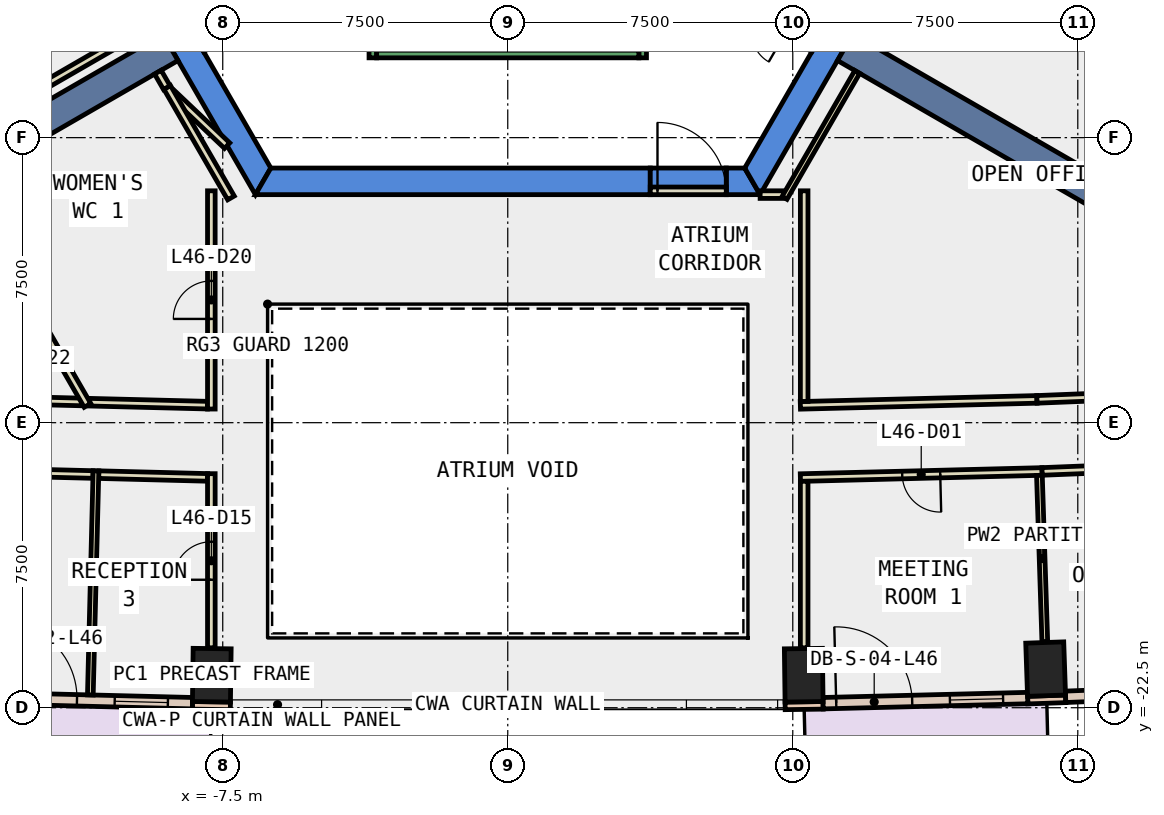
"""IFC4 building model, lengths in metres.
Left out: names, types, materials, properties, quantities, classifications, styles, units other than length and angle.
Written with IfcOpenShell. Run it as: python <this file> out.ifc"""

import sys

from ifc_helpers import new_model, si_unit, direction, frame, frame_2d, origin, origin_2d, place, context, subcontext, project, spatial, polyline, rectangle, outline, extrude, element, fill, save


model = new_model("IFC4")
c1 = context("Model", 3, precision=1e-05, world=origin(), true_north=direction((0.0, 1.0)))
c2 = subcontext(c1, "Body", "Model", "MODEL_VIEW")
j1 = project(units=[si_unit("LENGTHUNIT", "METRE"), si_unit("PLANEANGLEUNIT", "RADIAN")], contexts=[c1])
p1 = place(None, origin())
s1 = spatial("IfcSite", under=j1, at=p1, CompositionType="ELEMENT")
p2 = place(p1, origin())
s2 = spatial("IfcBuilding", under=s1, at=p2, CompositionType="ELEMENT")
p3 = place(p2, frame((0.0, 0.0, 206.6)))
s3 = spatial("IfcBuildingStorey", under=s2, at=p3, CompositionType="ELEMENT", Elevation=206.6)
for number, where, z_axis, x_axis in (
    (1, (-7.788, -21.644, -0.4), (0.0, 0.0, 1.0), (-1.0, 0.013, 0.0)),
    (2, (7.788, -21.644, -0.4), (0.0, 0.0, 1.0), (1.0, 0.013, 0.0)),
    (3, (14.154, -21.484, -0.4), (0.0, 0.0, 1.0), (0.999, 0.034, 0.0)),
):
    element("IfcColumn", number, at=place(p3, frame(where, z_axis=z_axis, x_axis=x_axis)), inside=s3, PredefinedType="COLUMN", context=c2, shape_type="SweptSolid", body=[
        extrude(rectangle(XDim=1.0, YDim=1.4, at=origin_2d()), origin(), (0.0, 0.0, 1.0), 4.2),
    ])
p4 = place(p3, frame((0.0, 0.0, -0.4)))
e4 = element("IfcWall", 4, at=p4, inside=s3, PredefinedType="SHEAR", context=c2, shape_type="SweptSolid", body=[
    extrude(outline(polyline([(-13.279, 2.5), (-6.64, -9.0), (-6.235, -8.3), (-12.471, 2.5), (-13.279, 2.5)])), origin(), (0.0, 0.0, 1.0), 4.2),
])
p5 = place(p3, frame((0.0, 0.0, -0.4)))
e5 = element("IfcWall", 5, at=p5, inside=s3, PredefinedType="SHEAR", context=c2, shape_type="SweptSolid", body=[
    extrude(outline(polyline([(3.75, -9.0), (3.75, -8.3), (-6.235, -8.3), (-6.64, -9.0), (3.75, -9.0)])), origin(), (0.0, 0.0, 1.0), 4.2),
])
p6 = place(p3, frame((0.0, 0.0, -0.4)))
e6 = element("IfcWall", 6, at=p6, inside=s3, PredefinedType="SHEAR", context=c2, shape_type="SweptSolid", body=[
    extrude(outline(polyline([(5.75, -8.3), (5.75, -9.0), (6.64, -9.0), (6.235, -8.3), (5.75, -8.3)])), origin(), (0.0, 0.0, 1.0), 4.2),
])
p7 = place(p3, frame((0.0, 0.0, 3.6)))
e7 = element("IfcWall", 7, at=p7, inside=s3, PredefinedType="SHEAR", context=c2, shape_type="SweptSolid", body=[
    extrude(outline(polyline([(5.75, -9.0), (5.75, -8.3), (3.75, -8.3), (3.75, -9.0), (5.75, -9.0)])), origin(), (0.0, 0.0, 1.0), 0.2),
])
p8 = place(p3, frame((0.0, 0.0, -0.4)))
e8 = element("IfcWall", 8, at=p8, inside=s3, PredefinedType="SHEAR", context=c2, shape_type="SweptSolid", body=[
    extrude(outline(polyline([(6.64, -9.0), (13.279, 2.5), (12.471, 2.5), (6.235, -8.3), (6.64, -9.0)])), origin(), (0.0, 0.0, 1.0), 4.2),
])
for number, where, z_axis, x_axis in (
    (9, (8.877, -5.125, -0.4), (0.0, 0.0, 1.0), (0.866, -0.5, 0.0)),
    (10, (-8.877, -5.125, -0.4), (0.0, 0.0, 1.0), (-0.866, -0.5, 0.0)),
):
    element("IfcWall", number, at=place(p3, frame(where, z_axis=z_axis, x_axis=x_axis)), inside=s3, PredefinedType="SHEAR", context=c2, shape_type="SweptSolid", body=[
        extrude(rectangle(XDim=9.0, YDim=0.8, at=frame_2d((4.5, 0.0))), origin(), (0.0, 0.0, 1.0), 4.2),
    ])
for number, where, z_axis, x_axis in (
    (11, (-8.299, -22.437, 0.0), (0.0, 0.0, 1.0), (1.0, -0.014, 0.0)),
    (12, (7.299, -22.451, 0.0), (0.0, 0.0, 1.0), (1.0, 0.014, 0.0)),
):
    element("IfcWall", number, at=place(p3, frame(where, z_axis=z_axis, x_axis=x_axis)), inside=s3, PredefinedType="STANDARD", context=c2, shape_type="SweptSolid", body=[
        extrude(rectangle(XDim=1.0, YDim=0.2, at=frame_2d((0.5, 0.0))), origin(), (0.0, 0.0, 1.0), 3.8),
    ])
p9 = place(p3, frame((13.682, -22.3, 0.0), z_axis=(0.0, 0.0, 1.0), x_axis=(0.999423561854, 0.033949138587, 0.0)))
e13 = element("IfcWall", 13, at=p9, inside=s3, PredefinedType="STANDARD", context=c2, shape_type="SweptSolid", body=[
    extrude(rectangle(XDim=1.0, YDim=0.2, at=frame_2d((0.5, 0.0))), origin(), (0.0, 0.0, 1.0), 3.8),
])
p10 = place(p3, frame((-13.681, -22.246, 0.0), z_axis=(0.0, 0.0, 1.0), x_axis=(0.999685717988, -0.025069209235, 0.0)))
e14 = element("IfcWall", 14, at=p10, inside=s3, PredefinedType="STANDARD", context=c2, shape_type="SweptSolid", body=[
    extrude(rectangle(XDim=5.385, YDim=0.3, at=frame_2d((2.693, 0.0))), origin(), (0.0, 0.0, 1.0), 3.8),
])
p11 = place(p10, frame((0.346, 0.0, 0.0)))
e15 = element("IfcOpeningElement", 15, at=p11, cuts=e14, PredefinedType="OPENING", context=c2, shape_type="SweptSolid", body=[
    extrude(rectangle(XDim=2.0, YDim=2.4, at=frame_2d((1.0, 1.2))), frame((0.0, 0.16, 0.0), z_axis=(0.0, -1.0, 0.0), x_axis=(1.0, 0.0, 0.0)), (0.0, 0.0, 1.0), 0.32),
])
p12 = place(p10, frame((3.339, 0.0, 0.9)))
e16 = element("IfcOpeningElement", 16, at=p12, cuts=e14, PredefinedType="OPENING", context=c2, shape_type="SweptSolid", body=[
    extrude(rectangle(XDim=1.4, YDim=2.6, at=frame_2d((0.7, 1.3))), frame((0.0, 0.16, 0.0), z_axis=(0.0, -1.0, 0.0), x_axis=(1.0, 0.0, 0.0)), (0.0, 0.0, 1.0), 0.32),
])
p13 = place(p3, frame((8.297, -22.381, 0.0), z_axis=(0.0, 0.0, 1.0), x_axis=(0.999685717988, 0.025069209235, 0.0)))
e17 = element("IfcWall", 17, at=p13, inside=s3, PredefinedType="STANDARD", context=c2, shape_type="SweptSolid", body=[
    extrude(rectangle(XDim=5.385, YDim=0.3, at=frame_2d((2.693, 0.0))), origin(), (0.0, 0.0, 1.0), 3.8),
])
p14 = place(p13, frame((0.346, 0.0, 0.0)))
e18 = element("IfcOpeningElement", 18, at=p14, cuts=e17, PredefinedType="OPENING", context=c2, shape_type="SweptSolid", body=[
    extrude(rectangle(XDim=2.0, YDim=2.4, at=frame_2d((1.0, 1.2))), frame((0.0, 0.16, 0.0), z_axis=(0.0, -1.0, 0.0), x_axis=(1.0, 0.0, 0.0)), (0.0, 0.0, 1.0), 0.32),
])
p15 = place(p13, frame((3.339, 0.0, 0.9)))
e19 = element("IfcOpeningElement", 19, at=p15, cuts=e17, PredefinedType="OPENING", context=c2, shape_type="SweptSolid", body=[
    extrude(rectangle(XDim=1.4, YDim=2.6, at=frame_2d((0.7, 1.3))), frame((0.0, 0.16, 0.0), z_axis=(0.0, -1.0, 0.0), x_axis=(1.0, 0.0, 0.0)), (0.0, 0.0, 1.0), 0.32),
])
p16 = place(p3, frame((14.679, -22.213, 0.0), z_axis=(0.0, 0.0, 1.0), x_axis=(0.999205241612, 0.039860822062, 0.0)))
e20 = element("IfcWall", 20, at=p16, inside=s3, PredefinedType="STANDARD", context=c2, shape_type="SweptSolid", body=[
    extrude(rectangle(XDim=5.365, YDim=0.3, at=frame_2d((2.683, 0.0))), origin(), (0.0, 0.0, 1.0), 3.8),
])
p17 = place(p16, frame((0.641, 0.0, 0.9)))
e21 = element("IfcOpeningElement", 21, at=p17, cuts=e20, PredefinedType="OPENING", context=c2, shape_type="SweptSolid", body=[
    extrude(rectangle(XDim=1.4, YDim=2.6, at=frame_2d((0.7, 1.3))), frame((0.0, 0.16, 0.0), z_axis=(0.0, -1.0, 0.0), x_axis=(1.0, 0.0, 0.0)), (0.0, 0.0, 1.0), 0.32),
])
p18 = place(p16, frame((3.324, 0.0, 0.9)))
e22 = element("IfcOpeningElement", 22, at=p18, cuts=e20, PredefinedType="OPENING", context=c2, shape_type="SweptSolid", body=[
    extrude(rectangle(XDim=1.4, YDim=2.6, at=frame_2d((0.7, 1.3))), frame((0.0, 0.16, 0.0), z_axis=(0.0, -1.0, 0.0), x_axis=(1.0, 0.0, 0.0)), (0.0, 0.0, 1.0), 0.32),
])
p19 = place(p3, frame((7.7, -14.544, 0.0), z_axis=(0.0, 0.0, 1.0), x_axis=(0.99968218628, 0.025209649611, 0.0)))
e23 = element("IfcWall", 23, at=p19, inside=s3, PredefinedType="PARTITIONING", context=c2, shape_type="SweptSolid", body=[
    extrude(rectangle(XDim=6.227, YDim=0.2, at=frame_2d((3.114, 0.0))), origin(), (0.0, 0.0, 1.0), 3.8),
])
p20 = place(p3, frame((13.925, -14.387, 0.0), z_axis=(0.0, 0.0, 1.0), x_axis=(0.999202986342, 0.039917315597, 0.0)))
e24 = element("IfcWall", 24, at=p20, inside=s3, PredefinedType="PARTITIONING", context=c2, shape_type="SweptSolid", body=[
    extrude(rectangle(XDim=5.382, YDim=0.2, at=frame_2d((2.691, 0.0))), origin(), (0.0, 0.0, 1.0), 3.8),
])
p21 = place(p3, frame((-11.009, -14.461, 0.0), z_axis=(0.0, 0.0, 1.0), x_axis=(0.999684451251, -0.025119672116, 0.0)))
e25 = element("IfcWall", 25, at=p21, inside=s3, PredefinedType="PARTITIONING", context=c2, shape_type="SweptSolid", body=[
    extrude(rectangle(XDim=3.11, YDim=0.2, at=frame_2d((1.555, 0.0))), origin(), (0.0, 0.0, 1.0), 3.8),
])
p22 = place(p3, frame((-13.925, -14.387, 0.0), z_axis=(0.0, 0.0, 1.0), x_axis=(0.999685678874, -0.025070768935, 0.0)))
e26 = element("IfcWall", 26, at=p22, inside=s3, PredefinedType="PARTITIONING", context=c2, shape_type="SweptSolid", body=[
    extrude(rectangle(XDim=2.717, YDim=0.2, at=frame_2d((1.358, 0.0))), origin(), (0.0, 0.0, 1.0), 3.8),
])
p23 = place(p22, frame((0.858, 0.0, 0.0)))
e27 = element("IfcOpeningElement", 27, at=p23, cuts=e26, PredefinedType="OPENING", context=c2, shape_type="SweptSolid", body=[
    extrude(rectangle(XDim=1.0, YDim=2.1, at=frame_2d((0.5, 1.05))), frame((0.0, 0.11, 0.0), z_axis=(0.0, -1.0, 0.0), x_axis=(1.0, 0.0, 0.0)), (0.0, 0.0, 1.0), 0.22),
])
p24 = place(p3, frame((14.061, -16.284, 0.0), z_axis=(0.0, 0.0, 1.0), x_axis=(-0.999679323762, -0.025322907453, 0.0)))
e28 = element("IfcWall", 28, at=p24, inside=s3, PredefinedType="PARTITIONING", context=c2, shape_type="SweptSolid", body=[
    extrude(rectangle(XDim=6.363, YDim=0.2, at=frame_2d((3.182, 0.0))), origin(), (0.0, 0.0, 1.0), 3.8),
])
p25 = place(p24, frame((2.682, 0.0, 0.0)))
e29 = element("IfcOpeningElement", 29, at=p25, cuts=e28, PredefinedType="OPENING", context=c2, shape_type="SweptSolid", body=[
    extrude(rectangle(XDim=1.0, YDim=2.1, at=frame_2d((0.5, 1.05))), frame((0.0, 0.11, 0.0), z_axis=(0.0, -1.0, 0.0), x_axis=(1.0, 0.0, 0.0)), (0.0, 0.0, 1.0), 0.22),
])
p26 = place(p3, frame((19.627, -16.061, 0.0), z_axis=(0.0, 0.0, 1.0), x_axis=(-0.999206061563, -0.039840262741, 0.0)))
e30 = element("IfcWall", 30, at=p26, inside=s3, PredefinedType="PARTITIONING", context=c2, shape_type="SweptSolid", body=[
    extrude(rectangle(XDim=5.57, YDim=0.2, at=frame_2d((2.785, 0.0))), origin(), (0.0, 0.0, 1.0), 3.8),
])
p27 = place(p26, frame((2.36, 0.0, 0.0)))
e31 = element("IfcOpeningElement", 31, at=p27, cuts=e30, PredefinedType="OPENING", context=c2, shape_type="SweptSolid", body=[
    extrude(rectangle(XDim=1.0, YDim=2.1, at=frame_2d((0.5, 1.05))), frame((0.0, 0.11, 0.0), z_axis=(0.0, -1.0, 0.0), x_axis=(1.0, 0.0, 0.0)), (0.0, 0.0, 1.0), 0.22),
])
p28 = place(p3, frame((-10.913, -16.364, 0.0), z_axis=(0.0, 0.0, 1.0), x_axis=(-0.999676990694, 0.02541484365, 0.0)))
e32 = element("IfcWall", 32, at=p28, inside=s3, PredefinedType="PARTITIONING", context=c2, shape_type="SweptSolid", body=[
    extrude(rectangle(XDim=3.074, YDim=0.2, at=frame_2d((1.537, 0.0))), origin(), (0.0, 0.0, 1.0), 3.8),
])
p29 = place(p3, frame((-7.9, -16.44, 0.0), z_axis=(0.0, 0.0, 1.0), x_axis=(-0.999675117104, 0.025488433531, 0.0)))
e33 = element("IfcWall", 33, at=p29, inside=s3, PredefinedType="PARTITIONING", context=c2, shape_type="SweptSolid", body=[
    extrude(rectangle(XDim=2.864, YDim=0.2, at=frame_2d((1.432, 0.0))), origin(), (0.0, 0.0, 1.0), 3.8),
])
p30 = place(p3, frame((6.641, -8.999, 0.0), z_axis=(0.0, 0.0, 1.0), x_axis=(1.0, 0.0, 0.0)))
e34 = element("IfcWall", 34, at=p30, inside=s3, PredefinedType="PARTITIONING", context=c2, shape_type="SweptSolid", body=[
    extrude(rectangle(XDim=0.617, YDim=0.2, at=frame_2d((0.309, 0.0))), origin(), (0.0, 0.0, 1.0), 3.8),
])
p31 = place(p3, frame((7.283, -9.086, 0.0), z_axis=(0.0, 0.0, 1.0), x_axis=(0.500035303972, 0.866005020067, 0.0)))
e35 = element("IfcWall", 35, at=p31, inside=s3, PredefinedType="PARTITIONING", context=c2, shape_type="SweptSolid", body=[
    extrude(rectangle(XDim=3.828, YDim=0.15, at=frame_2d((1.914, 0.0))), origin(), (0.0, 0.0, 1.0), 3.8),
])
p32 = place(p3, frame((7.8, -8.899, 0.0), z_axis=(0.0, 0.0, 1.0), x_axis=(0.0, -1.0, 0.0)))
e36 = element("IfcWall", 36, at=p32, inside=s3, PredefinedType="PARTITIONING", context=c2, shape_type="SweptSolid", body=[
    extrude(rectangle(XDim=5.542, YDim=0.2, at=frame_2d((2.771, 0.0))), origin(), (0.0, 0.0, 1.0), 3.8),
])
p33 = place(p3, frame((-8.84, -6.332, 0.0), z_axis=(0.0, 0.0, 1.0), x_axis=(0.726080635734, -0.687609562479, 0.0)))
e37 = element("IfcWall", 37, at=p33, inside=s3, PredefinedType="PARTITIONING", context=c2, shape_type="SweptSolid", body=[
    extrude(rectangle(XDim=2.005, YDim=0.2, at=frame_2d((1.003, 0.0))), origin(), (0.0, 0.0, 1.0), 3.8),
])
p34 = place(p3, frame((-7.8, -14.641, 0.0), z_axis=(0.0, 0.0, 1.0), x_axis=(0.0, 1.0, 0.0)))
e38 = element("IfcWall", 38, at=p34, inside=s3, PredefinedType="PARTITIONING", context=c2, shape_type="SweptSolid", body=[
    extrude(rectangle(XDim=5.742, YDim=0.2, at=frame_2d((2.871, 0.0))), origin(), (0.0, 0.0, 1.0), 3.8),
])
p35 = place(p34, frame((2.371, 0.0, 0.0)))
e39 = element("IfcOpeningElement", 39, at=p35, cuts=e38, PredefinedType="OPENING", context=c2, shape_type="SweptSolid", body=[
    extrude(rectangle(XDim=1.0, YDim=2.1, at=frame_2d((0.5, 1.05))), frame((0.0, 0.11, 0.0), z_axis=(0.0, -1.0, 0.0), x_axis=(1.0, 0.0, 0.0)), (0.0, 0.0, 1.0), 0.22),
])
p36 = place(p3, frame((-7.283, -9.086, 0.0), z_axis=(0.0, 0.0, 1.0), x_axis=(-0.499883958536, 0.86609238999, 0.0)))
e40 = element("IfcWall", 40, at=p36, inside=s3, PredefinedType="PARTITIONING", context=c2, shape_type="SweptSolid", body=[
    extrude(rectangle(XDim=3.359, YDim=0.2, at=frame_2d((1.679, 0.0))), origin(), (0.0, 0.0, 1.0), 3.8),
])
p37 = place(p3, frame((7.8, -16.542, 0.0), z_axis=(0.0, 0.0, 1.0), x_axis=(0.0, -1.0, 0.0)))
e41 = element("IfcWall", 41, at=p37, inside=s3, PredefinedType="PARTITIONING", context=c2, shape_type="SweptSolid", body=[
    extrude(rectangle(XDim=4.382, YDim=0.2, at=frame_2d((2.191, 0.0))), origin(), (0.0, 0.0, 1.0), 3.8),
])
p38 = place(p3, frame((-7.8, -20.924, 0.0), z_axis=(0.0, 0.0, 1.0), x_axis=(0.0, 1.0, 0.0)))
e42 = element("IfcWall", 42, at=p38, inside=s3, PredefinedType="PARTITIONING", context=c2, shape_type="SweptSolid", body=[
    extrude(rectangle(XDim=4.582, YDim=0.2, at=frame_2d((2.291, 0.0))), origin(), (0.0, 0.0, 1.0), 3.8),
])
p39 = place(p38, frame((1.791, 0.0, 0.0)))
e43 = element("IfcOpeningElement", 43, at=p39, cuts=e42, PredefinedType="OPENING", context=c2, shape_type="SweptSolid", body=[
    extrude(rectangle(XDim=1.0, YDim=2.1, at=frame_2d((0.5, 1.05))), frame((0.0, 0.11, 0.0), z_axis=(0.0, -1.0, 0.0), x_axis=(1.0, 0.0, 0.0)), (0.0, 0.0, 1.0), 0.22),
])
p40 = place(p3, frame((-8.973, -6.183, 0.0), z_axis=(0.0, 0.0, 1.0), x_axis=(-0.499557093027, 0.86628096528, 0.0)))
e44 = element("IfcWall", 44, at=p40, inside=s3, PredefinedType="PARTITIONING", context=c2, shape_type="SweptSolid", body=[
    extrude(rectangle(XDim=0.469, YDim=0.2, at=frame_2d((0.234, 0.0))), origin(), (0.0, 0.0, 1.0), 3.8),
])
p41 = place(p3, frame((-15.076, -7.788, 0.0), z_axis=(0.0, 0.0, 1.0), x_axis=(0.866092814325, 0.499883223337, 0.0)))
e45 = element("IfcWall", 45, at=p41, inside=s3, PredefinedType="PARTITIONING", context=c2, shape_type="SweptSolid", body=[
    extrude(rectangle(XDim=5.477, YDim=0.2, at=frame_2d((2.739, 0.0))), origin(), (0.0, 0.0, 1.0), 3.8),
])
p42 = place(p3, frame((-11.059, -14.545, 0.0), z_axis=(0.0, 0.0, 1.0), x_axis=(-0.499935899035, 0.866062409331, 0.0)))
e46 = element("IfcWall", 46, at=p42, inside=s3, PredefinedType="PARTITIONING", context=c2, shape_type="SweptSolid", body=[
    extrude(rectangle(XDim=6.667, YDim=0.2, at=frame_2d((3.333, 0.0))), origin(), (0.0, 0.0, 1.0), 3.8),
])
p43 = place(p3, frame((13.99, -16.386, 0.0), z_axis=(0.0, 0.0, 1.0), x_axis=(0.032438863816, -0.999473721573, 0.0)))
e47 = element("IfcWall", 47, at=p43, inside=s3, PredefinedType="PARTITIONING", context=c2, shape_type="SweptSolid", body=[
    extrude(rectangle(XDim=4.38, YDim=0.15, at=frame_2d((2.19, 0.0))), origin(), (0.0, 0.0, 1.0), 3.8),
])
p44 = place(p3, frame((-10.836, -16.266, 0.0), z_axis=(0.0, 0.0, 1.0), x_axis=(-0.025076969416, -0.999685523355, 0.0)))
e48 = element("IfcWall", 48, at=p44, inside=s3, PredefinedType="PARTITIONING", context=c2, shape_type="SweptSolid", body=[
    extrude(rectangle(XDim=5.9, YDim=0.15, at=frame_2d((2.95, 0.0))), origin(), (0.0, 0.0, 1.0), 3.8),
])
p45 = place(p3, frame((3.75, -8.9, 0.0), z_axis=(0.0, 0.0, 1.0), x_axis=(1.0, 0.0, 0.0)))
e49 = element("IfcWall", 49, at=p45, inside=s3, PredefinedType="PARTITIONING", context=c2, shape_type="SweptSolid", body=[
    extrude(rectangle(XDim=2.0, YDim=0.2, at=frame_2d((1.0, 0.0))), origin(), (0.0, 0.0, 1.0), 2.4),
])
p46 = place(p45, frame((0.19, 0.0, 0.0)))
e50 = element("IfcOpeningElement", 50, at=p46, cuts=e49, PredefinedType="OPENING", context=c2, shape_type="SweptSolid", body=[
    extrude(rectangle(XDim=1.8, YDim=2.1, at=frame_2d((0.9, 1.05))), frame((0.0, 0.11, 0.0), z_axis=(0.0, -1.0, 0.0), x_axis=(1.0, 0.0, 0.0)), (0.0, 0.0, 1.0), 0.22),
])
p47 = place(p3, frame((-3.55, -1.0, 0.0), z_axis=(0.0, 0.0, 1.0), x_axis=(0.0, -1.0, 0.0)))
e51 = element("IfcWall", 51, at=p47, inside=s3, PredefinedType="STANDARD", context=c2, shape_type="SweptSolid", body=[
    extrude(rectangle(XDim=4.4, YDim=0.2, at=frame_2d((2.2, 0.0))), origin(), (0.0, 0.0, 1.0), 3.8),
])
p48 = place(p47, frame((2.4, 0.0, 0.0)))
e52 = element("IfcOpeningElement", 52, at=p48, cuts=e51, PredefinedType="OPENING", context=c2, shape_type="SweptSolid", body=[
    extrude(rectangle(XDim=1.1, YDim=2.2, at=frame_2d((0.55, 1.1))), frame((0.0, 0.11, 0.0), z_axis=(0.0, -1.0, 0.0), x_axis=(1.0, 0.0, 0.0)), (0.0, 0.0, 1.0), 0.22),
])
p49 = place(p3, frame((3.55, -2.667, 0.0), z_axis=(0.0, 0.0, 1.0), x_axis=(0.0, -1.0, 0.0)))
e53 = element("IfcWall", 53, at=p49, inside=s3, PredefinedType="STANDARD", context=c2, shape_type="SweptSolid", body=[
    extrude(rectangle(XDim=2.733, YDim=0.2, at=frame_2d((1.366, 0.0))), origin(), (0.0, 0.0, 1.0), 3.8),
])
p50 = place(p3, frame((-3.45, -5.3, 0.0), z_axis=(0.0, 0.0, 1.0), x_axis=(1.0, 0.0, 0.0)))
e54 = element("IfcWall", 54, at=p50, inside=s3, PredefinedType="STANDARD", context=c2, shape_type="SweptSolid", body=[
    extrude(rectangle(XDim=6.9, YDim=0.2, at=frame_2d((3.45, 0.0))), origin(), (0.0, 0.0, 1.0), 3.8),
])
p51 = place(p11, origin())
e55 = element("IfcDoor", 55, at=p51, inside=s3, OperationType="SLIDING_TO_LEFT", PredefinedType="DOOR", context=c2, shape_type="SweptSolid", body=[
    extrude(rectangle(XDim=2.0, YDim=2.4, at=frame_2d((1.0, 1.2))), frame((0.0, 0.025, 0.0), z_axis=(0.0, -1.0, 0.0), x_axis=(1.0, 0.0, 0.0)), (0.0, 0.0, 1.0), 0.05),
])
fill(e15, e55)
p52 = place(p12, origin())
e56 = element("IfcWindow", 56, at=p52, inside=s3, PartitioningType="SINGLE_PANEL", PredefinedType="WINDOW", context=c2, shape_type="SweptSolid", body=[
    extrude(rectangle(XDim=1.4, YDim=2.6, at=frame_2d((0.7, 1.3))), frame((0.0, 0.03, 0.0), z_axis=(0.0, -1.0, 0.0), x_axis=(1.0, 0.0, 0.0)), (0.0, 0.0, 1.0), 0.06),
])
fill(e16, e56)
p53 = place(p14, origin())
e57 = element("IfcDoor", 57, at=p53, inside=s3, OperationType="SLIDING_TO_LEFT", PredefinedType="DOOR", context=c2, shape_type="SweptSolid", body=[
    extrude(rectangle(XDim=2.0, YDim=2.4, at=frame_2d((1.0, 1.2))), frame((0.0, 0.025, 0.0), z_axis=(0.0, -1.0, 0.0), x_axis=(1.0, 0.0, 0.0)), (0.0, 0.0, 1.0), 0.05),
])
fill(e18, e57)
p54 = place(p15, origin())
e58 = element("IfcWindow", 58, at=p54, inside=s3, PartitioningType="SINGLE_PANEL", PredefinedType="WINDOW", context=c2, shape_type="SweptSolid", body=[
    extrude(rectangle(XDim=1.4, YDim=2.6, at=frame_2d((0.7, 1.3))), frame((0.0, 0.03, 0.0), z_axis=(0.0, -1.0, 0.0), x_axis=(1.0, 0.0, 0.0)), (0.0, 0.0, 1.0), 0.06),
])
fill(e19, e58)
p55 = place(p25, origin())
e59 = element("IfcDoor", 59, at=p55, inside=s3, OperationType="SINGLE_SWING_LEFT", PredefinedType="DOOR", context=c2, shape_type="SweptSolid", body=[
    extrude(rectangle(XDim=1.0, YDim=2.1, at=frame_2d((0.5, 1.05))), frame((0.0, 0.025, 0.0), z_axis=(0.0, -1.0, 0.0), x_axis=(1.0, 0.0, 0.0)), (0.0, 0.0, 1.0), 0.05),
])
fill(e29, e59)
p56 = place(p39, origin())
e60 = element("IfcDoor", 60, at=p56, inside=s3, OperationType="SINGLE_SWING_LEFT", PredefinedType="DOOR", context=c2, shape_type="SweptSolid", body=[
    extrude(rectangle(XDim=1.0, YDim=2.1, at=frame_2d((0.5, 1.05))), frame((0.0, 0.025, 0.0), z_axis=(0.0, -1.0, 0.0), x_axis=(1.0, 0.0, 0.0)), (0.0, 0.0, 1.0), 0.05),
])
fill(e43, e60)
p57 = place(p35, origin())
e61 = element("IfcDoor", 61, at=p57, inside=s3, OperationType="SINGLE_SWING_LEFT", PredefinedType="DOOR", context=c2, shape_type="SweptSolid", body=[
    extrude(rectangle(XDim=1.0, YDim=2.1, at=frame_2d((0.5, 1.05))), frame((0.0, 0.025, 0.0), z_axis=(0.0, -1.0, 0.0), x_axis=(1.0, 0.0, 0.0)), (0.0, 0.0, 1.0), 0.05),
])
fill(e39, e61)
p58 = place(p46, origin())
e62 = element("IfcDoor", 62, at=p58, inside=s3, OperationType="DOUBLE_DOOR_SINGLE_SWING", PredefinedType="DOOR", context=c2, shape_type="SweptSolid", body=[
    extrude(rectangle(XDim=1.8, YDim=2.1, at=frame_2d((0.9, 1.05))), frame((0.0, 0.025, 0.0), z_axis=(0.0, -1.0, 0.0), x_axis=(1.0, 0.0, 0.0)), (0.0, 0.0, 1.0), 0.05),
])
fill(e50, e62)
save(model, sys.argv[1])
